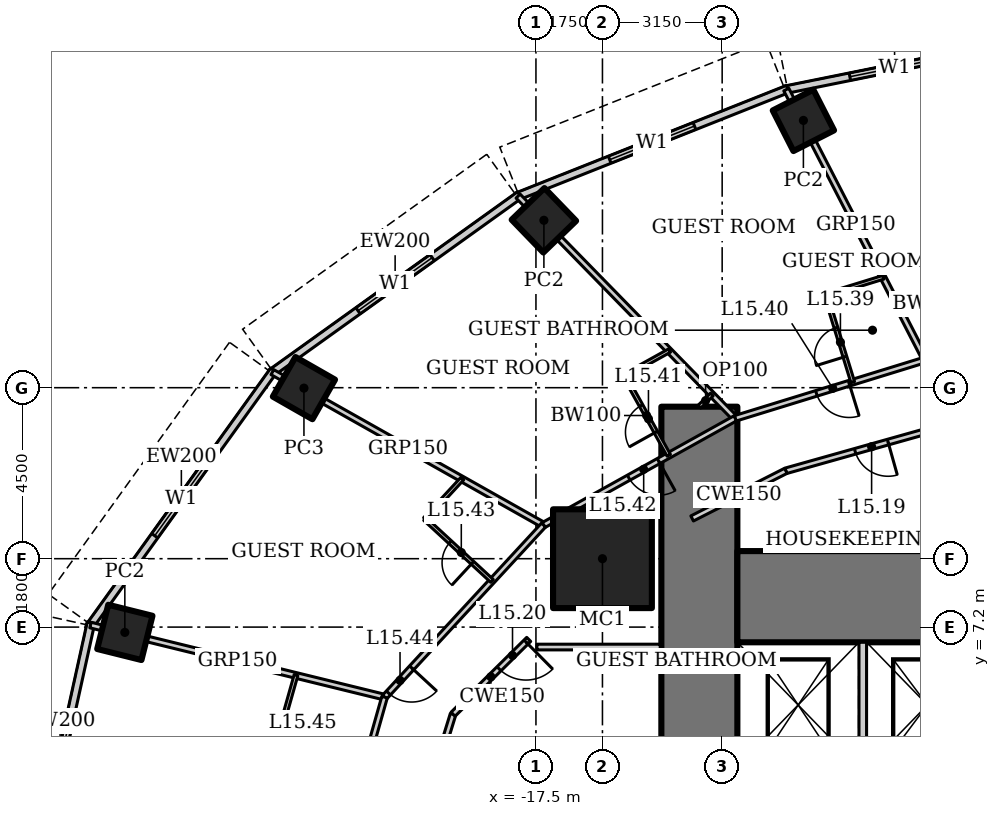
"""IFC4 building model, lengths in metres.
Left out: names, types, materials, properties, quantities, classifications, styles, units other than length and angle.
Written with IfcOpenShell. Run it as: python <this file> out.ifc"""

import sys

from ifc_helpers import new_model, si_unit, direction, frame, frame_2d, origin, origin_2d, place, context, subcontext, project, spatial, rectangle, hollow_rectangle, extrude, element, fill, save


model = new_model("IFC4")
c1 = context("Model", 3, precision=1e-05, world=origin(), true_north=direction((0.0, 1.0)))
c2 = subcontext(c1, "Body", "Model", "MODEL_VIEW")
j1 = project(units=[si_unit("LENGTHUNIT", "METRE"), si_unit("PLANEANGLEUNIT", "RADIAN")], contexts=[c1])
p1 = place(None, origin())
s1 = spatial("IfcSite", under=j1, at=p1, CompositionType="ELEMENT")
p2 = place(p1, origin())
s2 = spatial("IfcBuilding", under=s1, at=p2, CompositionType="ELEMENT")
p3 = place(p2, frame((0.0, 0.0, 69.4)))
s3 = spatial("IfcBuildingStorey", under=s2, at=p3, CompositionType="ELEMENT", Elevation=69.4)
p4 = place(p3, frame((-15.75, 9.0, 0.0), z_axis=(0.0, 0.0, 1.0), x_axis=(1.0, 0.0, 0.0)))
e1 = element("IfcColumn", 1, at=p4, inside=s3, PredefinedType="COLUMN", context=c2, shape_type="SweptSolid", body=[
    extrude(hollow_rectangle(XDim=2.6, YDim=2.6, WallThickness=0.13, at=origin_2d()), origin(), (0.0, 0.0, 1.0), 3.6),
])
for number, where, z_axis, x_axis in (
    (2, (-10.463, 20.534, 0.0), (0.0, 0.0, 1.0), (0.891, 0.454, 0.0)),
    (3, (-17.291, 17.905, 0.0), (0.0, 0.0, 1.0), (0.719, 0.695, 0.0)),
):
    element("IfcColumn", number, at=place(p3, frame(where, z_axis=z_axis, x_axis=x_axis)), inside=s3, PredefinedType="COLUMN", context=c2, shape_type="SweptSolid", body=[
        extrude(hollow_rectangle(XDim=1.2, YDim=1.2, WallThickness=0.1, at=origin_2d()), origin(), (0.0, 0.0, 1.0), 3.6),
    ])
p5 = place(p3, frame((-23.605, 13.489, 0.0), z_axis=(0.0, 0.0, 1.0), x_axis=(0.496139221777, 0.86824298017, 0.0)))
e4 = element("IfcColumn", 4, at=p5, inside=s3, PredefinedType="COLUMN", context=c2, shape_type="SweptSolid", body=[
    extrude(hollow_rectangle(XDim=1.2, YDim=1.2, WallThickness=0.12, at=origin_2d()), origin(), (0.0, 0.0, 1.0), 3.6),
])
p6 = place(p3, frame((-28.318, 7.06, 0.0), z_axis=(0.0, 0.0, 1.0), x_axis=(0.2419218956, 0.970295726276, 0.0)))
e5 = element("IfcColumn", 5, at=p6, inside=s3, PredefinedType="COLUMN", context=c2, shape_type="SweptSolid", body=[
    extrude(hollow_rectangle(XDim=1.2, YDim=1.2, WallThickness=0.1, at=origin_2d()), origin(), (0.0, 0.0, 1.0), 3.6),
])
p7 = place(p3, frame((-13.2, 13.0, 0.0), z_axis=(0.0, 0.0, 1.0), x_axis=(0.0, -1.0, 0.0)))
e6 = element("IfcWall", 6, at=p7, inside=s3, PredefinedType="SHEAR", context=c2, shape_type="SweptSolid", body=[
    extrude(rectangle(XDim=26.0, YDim=2.0, at=frame_2d((13.0, 0.0))), origin(), (0.0, 0.0, 1.0), 3.6),
])
p8 = place(p7, frame((12.1, 0.0, 0.0)))
e7 = element("IfcOpeningElement", 7, at=p8, cuts=e6, PredefinedType="OPENING", context=c2, shape_type="SweptSolid", body=[
    extrude(rectangle(XDim=1.8, YDim=2.1, at=frame_2d((0.9, 1.05))), frame((0.0, 1.01, 0.0), z_axis=(0.0, -1.0, 0.0), x_axis=(1.0, 0.0, 0.0)), (0.0, 0.0, 1.0), 2.02),
])
p9 = place(p3, frame((12.2, 8.0, 0.0), z_axis=(0.0, 0.0, 1.0), x_axis=(-1.0, 0.0, 0.0)))
e8 = element("IfcWall", 8, at=p9, inside=s3, PredefinedType="SHEAR", context=c2, shape_type="SweptSolid", body=[
    extrude(rectangle(XDim=24.4, YDim=2.4, at=frame_2d((12.2, 0.0))), origin(), (0.0, 0.0, 1.0), 3.6),
])
p10 = place(p3, frame((-8.9, 3.5, 0.0), z_axis=(0.0, 0.0, 1.0), x_axis=(0.0, 1.0, 0.0)))
e9 = element("IfcWall", 9, at=p10, inside=s3, PredefinedType="SOLIDWALL", context=c2, shape_type="SweptSolid", body=[
    extrude(rectangle(XDim=3.3, YDim=0.2, at=frame_2d((1.65, 0.0))), origin(), (0.0, 0.0, 1.0), 3.6),
])
p11 = place(p3, frame((-5.17, 22.504, 0.0), z_axis=(0.0, 0.0, 1.0), x_axis=(-0.980251657452, -0.197754110105, 0.0)))
e10 = element("IfcWall", 10, at=p11, inside=s3, PredefinedType="SOLIDWALL", context=c2, shape_type="SweptSolid", body=[
    extrude(rectangle(XDim=5.904, YDim=0.2, at=frame_2d((2.952, 0.0))), origin(), (0.0, 0.0, 1.0), 3.45),
])
p12 = place(p11, frame((1.752, 0.0, 0.5)))
e11 = element("IfcOpeningElement", 11, at=p12, cuts=e10, PredefinedType="OPENING", context=c2, shape_type="SweptSolid", body=[
    extrude(rectangle(XDim=2.4, YDim=2.2, at=frame_2d((1.2, 1.1))), frame((0.0, 0.11, 0.0), z_axis=(0.0, -1.0, 0.0), x_axis=(1.0, 0.0, 0.0)), (0.0, 0.0, 1.0), 0.22),
])
p13 = place(p3, frame((-10.869, 21.363, 0.0), z_axis=(0.0, 0.0, 1.0), x_axis=(-0.929358351251, -0.369178892895, 0.0)))
e12 = element("IfcWall", 12, at=p13, inside=s3, PredefinedType="SOLIDWALL", context=c2, shape_type="SweptSolid", body=[
    extrude(rectangle(XDim=7.692, YDim=0.2, at=frame_2d((3.846, 0.0))), origin(), (0.0, 0.0, 1.0), 3.45),
])
p14 = place(p13, frame((2.646, 0.0, 0.5)))
e13 = element("IfcOpeningElement", 13, at=p14, cuts=e12, PredefinedType="OPENING", context=c2, shape_type="SweptSolid", body=[
    extrude(rectangle(XDim=2.4, YDim=2.2, at=frame_2d((1.2, 1.1))), frame((0.0, 0.11, 0.0), z_axis=(0.0, -1.0, 0.0), x_axis=(1.0, 0.0, 0.0)), (0.0, 0.0, 1.0), 0.22),
])
p15 = place(p3, frame((-17.929, 18.572, 0.0), z_axis=(0.0, 0.0, 1.0), x_axis=(-0.812791321576, -0.582554948112, 0.0)))
e14 = element("IfcWall", 14, at=p15, inside=s3, PredefinedType="SOLIDWALL", context=c2, shape_type="SweptSolid", body=[
    extrude(rectangle(XDim=8.063, YDim=0.2, at=frame_2d((4.032, 0.0))), origin(), (0.0, 0.0, 1.0), 3.45),
])
p16 = place(p15, frame((2.832, 0.0, 0.5)))
e15 = element("IfcOpeningElement", 15, at=p16, cuts=e14, PredefinedType="OPENING", context=c2, shape_type="SweptSolid", body=[
    extrude(rectangle(XDim=2.4, YDim=2.2, at=frame_2d((1.2, 1.1))), frame((0.0, 0.11, 0.0), z_axis=(0.0, -1.0, 0.0), x_axis=(1.0, 0.0, 0.0)), (0.0, 0.0, 1.0), 0.22),
])
p17 = place(p3, frame((-24.4, 13.957, 0.0), z_axis=(0.0, 0.0, 1.0), x_axis=(-0.583937613703, -0.811798536155, 0.0)))
e16 = element("IfcWall", 16, at=p17, inside=s3, PredefinedType="SOLIDWALL", context=c2, shape_type="SweptSolid", body=[
    extrude(rectangle(XDim=8.323, YDim=0.2, at=frame_2d((4.162, 0.0))), origin(), (0.0, 0.0, 1.0), 3.45),
])
p18 = place(p17, frame((2.961, 0.0, 0.5)))
e17 = element("IfcOpeningElement", 17, at=p18, cuts=e16, PredefinedType="OPENING", context=c2, shape_type="SweptSolid", body=[
    extrude(rectangle(XDim=2.4, YDim=2.2, at=frame_2d((1.2, 1.1))), frame((0.0, 0.11, 0.0), z_axis=(0.0, -1.0, 0.0), x_axis=(1.0, 0.0, 0.0)), (0.0, 0.0, 1.0), 0.22),
])
p19 = place(p3, frame((-29.208, 7.318, 0.0), z_axis=(0.0, 0.0, 1.0), x_axis=(-0.215238065514, -0.976561608478, 0.0)))
e18 = element("IfcWall", 18, at=p19, inside=s3, PredefinedType="SOLIDWALL", context=c2, shape_type="SweptSolid", body=[
    extrude(rectangle(XDim=7.562, YDim=0.2, at=frame_2d((3.781, 0.0))), origin(), (0.0, 0.0, 1.0), 3.45),
])
p20 = place(p19, frame((2.581, 0.0, 0.5)))
e19 = element("IfcOpeningElement", 19, at=p20, cuts=e18, PredefinedType="OPENING", context=c2, shape_type="SweptSolid", body=[
    extrude(rectangle(XDim=2.4, YDim=2.2, at=frame_2d((1.2, 1.1))), frame((0.0, 0.11, 0.0), z_axis=(0.0, -1.0, 0.0), x_axis=(1.0, 0.0, 0.0)), (0.0, 0.0, 1.0), 0.22),
])
p21 = place(p3, frame((-10.912, 21.346, 0.0), z_axis=(0.0, 0.0, 1.0), x_axis=(0.45752665959, -0.889195904042, 0.0)))
e20 = element("IfcWall", 20, at=p21, inside=s3, PredefinedType="PARTITIONING", context=c2, shape_type="SweptSolid", body=[
    extrude(rectangle(XDim=7.997, YDim=0.15, at=frame_2d((3.999, 0.0))), origin(), (0.0, 0.0, 1.0), 2.528),
])
p22 = place(p3, frame((-17.97, 18.542, 0.0), z_axis=(0.0, 0.0, 1.0), x_axis=(0.698757291878, -0.715358823981, 0.0)))
e21 = element("IfcWall", 21, at=p22, inside=s3, PredefinedType="PARTITIONING", context=c2, shape_type="SweptSolid", body=[
    extrude(rectangle(XDim=8.177, YDim=0.15, at=frame_2d((4.088, 0.0))), origin(), (0.0, 0.0, 1.0), 2.528),
])
p23 = place(p3, frame((-24.435, 13.909, 0.0), z_axis=(0.0, 0.0, 1.0), x_axis=(0.871075246657, -0.491149584813, 0.0)))
e22 = element("IfcWall", 22, at=p23, inside=s3, PredefinedType="PARTITIONING", context=c2, shape_type="SweptSolid", body=[
    extrude(rectangle(XDim=8.192, YDim=0.15, at=frame_2d((4.096, 0.0))), origin(), (0.0, 0.0, 1.0), 2.693),
])
p24 = place(p3, frame((-29.222, 7.254, 0.0), z_axis=(0.0, 0.0, 1.0), x_axis=(0.971235585172, -0.238120637695, 0.0)))
e23 = element("IfcWall", 23, at=p24, inside=s3, PredefinedType="PARTITIONING", context=c2, shape_type="SweptSolid", body=[
    extrude(rectangle(XDim=7.968, YDim=0.15, at=frame_2d((3.984, 0.0))), origin(), (0.0, 0.0, 1.0), 2.333),
])
p25 = place(p3, frame((-7.253, 14.235, 0.0), z_axis=(0.0, 0.0, 1.0), x_axis=(-0.955657956744, -0.294478980085, 0.0)))
e24 = element("IfcWall", 24, at=p25, inside=s3, PredefinedType="PARTITIONING", context=c2, shape_type="SweptSolid", body=[
    extrude(rectangle(XDim=5.236, YDim=0.15, at=frame_2d((2.618, 0.0))), origin(), (0.0, 0.0, 1.0), 3.45),
])
p26 = place(p25, frame((2.1, 0.0, 0.0)))
e25 = element("IfcOpeningElement", 25, at=p26, cuts=e24, PredefinedType="OPENING", context=c2, shape_type="SweptSolid", body=[
    extrude(rectangle(XDim=0.9, YDim=2.1, at=frame_2d((0.45, 1.05))), frame((0.0, 0.085, 0.0), z_axis=(0.0, -1.0, 0.0), x_axis=(1.0, 0.0, 0.0)), (0.0, 0.0, 1.0), 0.17),
])
p27 = place(p3, frame((-12.257, 12.693, 0.0), z_axis=(0.0, 0.0, 1.0), x_axis=(-0.873695910579, -0.486472461541, 0.0)))
e26 = element("IfcWall", 26, at=p27, inside=s3, PredefinedType="PARTITIONING", context=c2, shape_type="SweptSolid", body=[
    extrude(rectangle(XDim=5.771, YDim=0.15, at=frame_2d((2.885, 0.0))), origin(), (0.0, 0.0, 1.0), 3.45),
])
p28 = place(p27, frame((2.306, 0.0, 0.0)))
e27 = element("IfcOpeningElement", 27, at=p28, cuts=e26, PredefinedType="OPENING", context=c2, shape_type="SweptSolid", body=[
    extrude(rectangle(XDim=0.9, YDim=2.1, at=frame_2d((0.45, 1.05))), frame((0.0, 0.085, 0.0), z_axis=(0.0, -1.0, 0.0), x_axis=(1.0, 0.0, 0.0)), (0.0, 0.0, 1.0), 0.17),
])
p29 = place(p3, frame((-17.299, 9.885, 0.0), z_axis=(0.0, 0.0, 1.0), x_axis=(-0.678641806296, -0.734469399463, 0.0)))
e28 = element("IfcWall", 28, at=p29, inside=s3, PredefinedType="PARTITIONING", context=c2, shape_type="SweptSolid", body=[
    extrude(rectangle(XDim=6.166, YDim=0.15, at=frame_2d((3.083, 0.0))), origin(), (0.0, 0.0, 1.0), 3.45),
])
p30 = place(p29, frame((5.116, 0.0, 0.0)))
e29 = element("IfcOpeningElement", 29, at=p30, cuts=e28, PredefinedType="OPENING", context=c2, shape_type="SweptSolid", body=[
    extrude(rectangle(XDim=0.9, YDim=2.1, at=frame_2d((0.45, 1.05))), frame((0.0, 0.085, 0.0), z_axis=(0.0, -1.0, 0.0), x_axis=(1.0, 0.0, 0.0)), (0.0, 0.0, 1.0), 0.17),
])
p31 = place(p3, frame((-21.484, 5.356, 0.0), z_axis=(0.0, 0.0, 1.0), x_axis=(-0.272386051236, -0.962188047677, 0.0)))
e30 = element("IfcWall", 30, at=p31, inside=s3, PredefinedType="PARTITIONING", context=c2, shape_type="SweptSolid", body=[
    extrude(rectangle(XDim=5.567, YDim=0.15, at=frame_2d((2.783, 0.0))), origin(), (0.0, 0.0, 1.0), 3.45),
])
p32 = place(p31, frame((4.517, 0.0, 0.0)))
e31 = element("IfcOpeningElement", 31, at=p32, cuts=e30, PredefinedType="OPENING", context=c2, shape_type="SweptSolid", body=[
    extrude(rectangle(XDim=0.9, YDim=2.1, at=frame_2d((0.45, 1.05))), frame((0.0, 0.085, 0.0), z_axis=(0.0, -1.0, 0.0), x_axis=(1.0, 0.0, 0.0)), (0.0, 0.0, 1.0), 0.17),
])
p33 = place(p3, frame((-6.411, 12.582, 0.0), z_axis=(0.0, 0.0, 1.0), x_axis=(-0.962643729928, -0.270771211967, 0.0)))
e32 = element("IfcWall", 32, at=p33, inside=s3, PredefinedType="PARTITIONING", context=c2, shape_type="SweptSolid", body=[
    extrude(rectangle(XDim=4.688, YDim=0.15, at=frame_2d((2.344, 0.0))), origin(), (0.0, 0.0, 1.0), 3.45),
])
p34 = place(p33, frame((1.894, 0.0, 0.0)))
e33 = element("IfcOpeningElement", 33, at=p34, cuts=e32, PredefinedType="OPENING", context=c2, shape_type="SweptSolid", body=[
    extrude(rectangle(XDim=0.9, YDim=2.1, at=frame_2d((0.45, 1.05))), frame((0.0, 0.085, 0.0), z_axis=(0.0, -1.0, 0.0), x_axis=(1.0, 0.0, 0.0)), (0.0, 0.0, 1.0), 0.17),
])
p35 = place(p3, frame((-19.681, 4.907, 0.0), z_axis=(0.0, 0.0, 1.0), x_axis=(-0.295778570807, -0.955256529447, 0.0)))
e34 = element("IfcWall", 34, at=p35, inside=s3, PredefinedType="PARTITIONING", context=c2, shape_type="SweptSolid", body=[
    extrude(rectangle(XDim=4.195, YDim=0.15, at=frame_2d((2.097, 0.0))), origin(), (0.0, 0.0, 1.0), 3.45),
])
p36 = place(p3, frame((-9.164, 13.646, 0.0), z_axis=(0.0, 0.0, 1.0), x_axis=(-0.294507586191, 0.955649141514, 0.0)))
e35 = element("IfcWall", 35, at=p36, inside=s3, PredefinedType="PARTITIONING", context=c2, shape_type="SweptSolid", body=[
    extrude(rectangle(XDim=2.4, YDim=0.1, at=frame_2d((1.2, 0.0))), origin(), (0.0, 0.0, 1.0), 3.45),
])
p37 = place(p36, frame((0.7, 0.0, 0.0)))
e36 = element("IfcOpeningElement", 36, at=p37, cuts=e35, PredefinedType="OPENING", context=c2, shape_type="SweptSolid", body=[
    extrude(rectangle(XDim=0.8, YDim=2.1, at=frame_2d((0.4, 1.05))), frame((0.0, 0.06, 0.0), z_axis=(0.0, -1.0, 0.0), x_axis=(1.0, 0.0, 0.0)), (0.0, 0.0, 1.0), 0.12),
])
p38 = place(p3, frame((-9.871, 15.939, 0.0), z_axis=(0.0, 0.0, 1.0), x_axis=(0.955642133669, 0.29453032502, 0.0)))
e37 = element("IfcWall", 37, at=p38, inside=s3, PredefinedType="PARTITIONING", context=c2, shape_type="SweptSolid", body=[
    extrude(rectangle(XDim=1.583, YDim=0.1, at=frame_2d((0.791, 0.0))), origin(), (0.0, 0.0, 1.0), 3.45),
])
p39 = place(p3, frame((-14.004, 11.719, 0.0), z_axis=(0.0, 0.0, 1.0), x_axis=(-0.486445964861, 0.873710663361, 0.0)))
e38 = element("IfcWall", 38, at=p39, inside=s3, PredefinedType="PARTITIONING", context=c2, shape_type="SweptSolid", body=[
    extrude(rectangle(XDim=2.4, YDim=0.1, at=frame_2d((1.2, 0.0))), origin(), (0.0, 0.0, 1.0), 3.45),
])
p40 = place(p39, frame((0.7, 0.0, 0.0)))
e39 = element("IfcOpeningElement", 39, at=p40, cuts=e38, PredefinedType="OPENING", context=c2, shape_type="SweptSolid", body=[
    extrude(rectangle(XDim=0.8, YDim=2.1, at=frame_2d((0.4, 1.05))), frame((0.0, 0.06, 0.0), z_axis=(0.0, -1.0, 0.0), x_axis=(1.0, 0.0, 0.0)), (0.0, 0.0, 1.0), 0.12),
])
p41 = place(p3, frame((-15.172, 13.816, 0.0), z_axis=(0.0, 0.0, 1.0), x_axis=(0.873640924532, 0.486571202377, 0.0)))
e40 = element("IfcWall", 40, at=p41, inside=s3, PredefinedType="PARTITIONING", context=c2, shape_type="SweptSolid", body=[
    extrude(rectangle(XDim=1.362, YDim=0.1, at=frame_2d((0.681, 0.0))), origin(), (0.0, 0.0, 1.0), 3.45),
])
p42 = place(p3, frame((-18.656, 8.416, 0.0), z_axis=(0.0, 0.0, 1.0), x_axis=(-0.73447964986, 0.678630712495, 0.0)))
e41 = element("IfcWall", 41, at=p42, inside=s3, PredefinedType="PARTITIONING", context=c2, shape_type="SweptSolid", body=[
    extrude(rectangle(XDim=2.4, YDim=0.1, at=frame_2d((1.2, 0.0))), origin(), (0.0, 0.0, 1.0), 3.45),
])
p43 = place(p42, frame((0.7, 0.0, 0.0)))
e42 = element("IfcOpeningElement", 42, at=p43, cuts=e41, PredefinedType="OPENING", context=c2, shape_type="SweptSolid", body=[
    extrude(rectangle(XDim=0.8, YDim=2.1, at=frame_2d((0.4, 1.05))), frame((0.0, 0.06, 0.0), z_axis=(0.0, -1.0, 0.0), x_axis=(1.0, 0.0, 0.0)), (0.0, 0.0, 1.0), 0.12),
])
p44 = place(p3, frame((-20.419, 10.045, 0.0), z_axis=(0.0, 0.0, 1.0), x_axis=(0.67861657312, 0.734492713842, 0.0)))
e43 = element("IfcWall", 43, at=p44, inside=s3, PredefinedType="PARTITIONING", context=c2, shape_type="SweptSolid", body=[
    extrude(rectangle(XDim=1.446, YDim=0.1, at=frame_2d((0.723, 0.0))), origin(), (0.0, 0.0, 1.0), 3.45),
])
p45 = place(p3, frame((-24.338, 4.086, 0.0), z_axis=(0.0, 0.0, 1.0), x_axis=(0.27242442481, 0.962177183666, 0.0)))
e44 = element("IfcWall", 44, at=p45, inside=s3, PredefinedType="PARTITIONING", context=c2, shape_type="SweptSolid", body=[
    extrude(rectangle(XDim=1.924, YDim=0.1, at=frame_2d((0.962, 0.0))), origin(), (0.0, 0.0, 1.0), 3.45),
])
p46 = place(p3, frame((-13.2, 13.0, 0.0), z_axis=(0.0, 0.0, 1.0), x_axis=(0.715289751842, 0.698827998087, 0.0)))
e45 = element("IfcWall", 45, at=p46, inside=s3, PredefinedType="PARTITIONING", context=c2, shape_type="SweptSolid", body=[
    extrude(rectangle(XDim=0.46, YDim=0.1, at=frame_2d((0.23, 0.0))), origin(), (0.0, 0.0, 1.0), 3.45),
])
p47 = place(p3, frame((-10.924, 11.312, 0.0), z_axis=(0.0, 0.0, 1.0), x_axis=(-0.891388152271, -0.453240732935, 0.0)))
e46 = element("IfcWall", 46, at=p47, inside=s3, PredefinedType="PARTITIONING", context=c2, shape_type="SweptSolid", body=[
    extrude(rectangle(XDim=2.766, YDim=0.15, at=frame_2d((1.383, 0.0))), origin(), (0.0, 0.0, 1.0), 3.45),
])
p48 = place(p3, frame((-17.69, 6.876, 0.0), z_axis=(0.0, 0.0, 1.0), x_axis=(-0.710845937688, -0.70334774676, 0.0)))
e47 = element("IfcWall", 47, at=p48, inside=s3, PredefinedType="PARTITIONING", context=c2, shape_type="SweptSolid", body=[
    extrude(rectangle(XDim=2.8, YDim=0.15, at=frame_2d((1.4, 0.0))), origin(), (0.0, 0.0, 1.0), 3.45),
])
p49 = place(p48, frame((0.1, 0.0, 0.0)))
e48 = element("IfcOpeningElement", 48, at=p49, cuts=e47, PredefinedType="OPENING", context=c2, shape_type="SweptSolid", body=[
    extrude(rectangle(XDim=1.0, YDim=2.1, at=frame_2d((0.5, 1.05))), frame((0.0, 0.085, 0.0), z_axis=(0.0, -1.0, 0.0), x_axis=(1.0, 0.0, 0.0)), (0.0, 0.0, 1.0), 0.17),
])
p50 = place(p3, frame((-14.23, 6.675, 0.0), z_axis=(0.0, 0.0, 1.0), x_axis=(-1.0, 0.0, 0.0)))
e49 = element("IfcWall", 49, at=p50, inside=s3, PredefinedType="PARTITIONING", context=c2, shape_type="SweptSolid", body=[
    extrude(rectangle(XDim=3.245, YDim=0.15, at=frame_2d((1.622, 0.0))), origin(), (0.0, 0.0, 1.0), 3.45),
])
p51 = place(p12, origin())
e50 = element("IfcWindow", 50, at=p51, inside=s3, PartitioningType="SINGLE_PANEL", PredefinedType="WINDOW", context=c2, shape_type="SweptSolid", body=[
    extrude(rectangle(XDim=2.4, YDim=2.2, at=frame_2d((1.2, 1.1))), frame((0.0, 0.03, 0.0), z_axis=(0.0, -1.0, 0.0), x_axis=(1.0, 0.0, 0.0)), (0.0, 0.0, 1.0), 0.06),
])
fill(e11, e50)
p52 = place(p14, origin())
e51 = element("IfcWindow", 51, at=p52, inside=s3, PartitioningType="SINGLE_PANEL", PredefinedType="WINDOW", context=c2, shape_type="SweptSolid", body=[
    extrude(rectangle(XDim=2.4, YDim=2.2, at=frame_2d((1.2, 1.1))), frame((0.0, 0.03, 0.0), z_axis=(0.0, -1.0, 0.0), x_axis=(1.0, 0.0, 0.0)), (0.0, 0.0, 1.0), 0.06),
])
fill(e13, e51)
p53 = place(p16, origin())
e52 = element("IfcWindow", 52, at=p53, inside=s3, PartitioningType="SINGLE_PANEL", PredefinedType="WINDOW", context=c2, shape_type="SweptSolid", body=[
    extrude(rectangle(XDim=2.4, YDim=2.2, at=frame_2d((1.2, 1.1))), frame((0.0, 0.03, 0.0), z_axis=(0.0, -1.0, 0.0), x_axis=(1.0, 0.0, 0.0)), (0.0, 0.0, 1.0), 0.06),
])
fill(e15, e52)
p54 = place(p18, origin())
e53 = element("IfcWindow", 53, at=p54, inside=s3, PartitioningType="SINGLE_PANEL", PredefinedType="WINDOW", context=c2, shape_type="SweptSolid", body=[
    extrude(rectangle(XDim=2.4, YDim=2.2, at=frame_2d((1.2, 1.1))), frame((0.0, 0.03, 0.0), z_axis=(0.0, -1.0, 0.0), x_axis=(1.0, 0.0, 0.0)), (0.0, 0.0, 1.0), 0.06),
])
fill(e17, e53)
p55 = place(p20, origin())
e54 = element("IfcWindow", 54, at=p55, inside=s3, PartitioningType="SINGLE_PANEL", PredefinedType="WINDOW", context=c2, shape_type="SweptSolid", body=[
    extrude(rectangle(XDim=2.4, YDim=2.2, at=frame_2d((1.2, 1.1))), frame((0.0, 0.03, 0.0), z_axis=(0.0, -1.0, 0.0), x_axis=(1.0, 0.0, 0.0)), (0.0, 0.0, 1.0), 0.06),
])
fill(e19, e54)
p56 = place(p34, origin())
e55 = element("IfcDoor", 55, at=p56, inside=s3, OperationType="SINGLE_SWING_LEFT", PredefinedType="DOOR", context=c2, shape_type="SweptSolid", body=[
    extrude(rectangle(XDim=0.9, YDim=2.1, at=frame_2d((0.45, 1.05))), frame((0.0, 0.025, 0.0), z_axis=(0.0, -1.0, 0.0), x_axis=(1.0, 0.0, 0.0)), (0.0, 0.0, 1.0), 0.05),
])
fill(e33, e55)
p57 = place(p49, origin())
e56 = element("IfcDoor", 56, at=p57, inside=s3, OperationType="SINGLE_SWING_LEFT", PredefinedType="DOOR", context=c2, shape_type="SweptSolid", body=[
    extrude(rectangle(XDim=1.0, YDim=2.1, at=frame_2d((0.5, 1.05))), frame((0.0, 0.025, 0.0), z_axis=(0.0, -1.0, 0.0), x_axis=(1.0, 0.0, 0.0)), (0.0, 0.0, 1.0), 0.05),
])
fill(e48, e56)
p58 = place(p37, origin())
e57 = element("IfcDoor", 57, at=p58, inside=s3, OperationType="SINGLE_SWING_LEFT", PredefinedType="DOOR", context=c2, shape_type="SweptSolid", body=[
    extrude(rectangle(XDim=0.8, YDim=2.1, at=frame_2d((0.4, 1.05))), frame((0.0, 0.025, 0.0), z_axis=(0.0, -1.0, 0.0), x_axis=(1.0, 0.0, 0.0)), (0.0, 0.0, 1.0), 0.05),
])
fill(e36, e57)
p59 = place(p26, origin())
e58 = element("IfcDoor", 58, at=p59, inside=s3, OperationType="SINGLE_SWING_LEFT", PredefinedType="DOOR", context=c2, shape_type="SweptSolid", body=[
    extrude(rectangle(XDim=0.9, YDim=2.1, at=frame_2d((0.45, 1.05))), frame((0.0, 0.025, 0.0), z_axis=(0.0, -1.0, 0.0), x_axis=(1.0, 0.0, 0.0)), (0.0, 0.0, 1.0), 0.05),
])
fill(e25, e58)
p60 = place(p40, origin())
e59 = element("IfcDoor", 59, at=p60, inside=s3, OperationType="SINGLE_SWING_LEFT", PredefinedType="DOOR", context=c2, shape_type="SweptSolid", body=[
    extrude(rectangle(XDim=0.8, YDim=2.1, at=frame_2d((0.4, 1.05))), frame((0.0, 0.025, 0.0), z_axis=(0.0, -1.0, 0.0), x_axis=(1.0, 0.0, 0.0)), (0.0, 0.0, 1.0), 0.05),
])
fill(e39, e59)
p61 = place(p28, origin())
e60 = element("IfcDoor", 60, at=p61, inside=s3, OperationType="SINGLE_SWING_LEFT", PredefinedType="DOOR", context=c2, shape_type="SweptSolid", body=[
    extrude(rectangle(XDim=0.9, YDim=2.1, at=frame_2d((0.45, 1.05))), frame((0.0, 0.025, 0.0), z_axis=(0.0, -1.0, 0.0), x_axis=(1.0, 0.0, 0.0)), (0.0, 0.0, 1.0), 0.05),
])
fill(e27, e60)
p62 = place(p43, origin())
e61 = element("IfcDoor", 61, at=p62, inside=s3, OperationType="SINGLE_SWING_LEFT", PredefinedType="DOOR", context=c2, shape_type="SweptSolid", body=[
    extrude(rectangle(XDim=0.8, YDim=2.1, at=frame_2d((0.4, 1.05))), frame((0.0, 0.025, 0.0), z_axis=(0.0, -1.0, 0.0), x_axis=(1.0, 0.0, 0.0)), (0.0, 0.0, 1.0), 0.05),
])
fill(e42, e61)
p63 = place(p30, origin())
e62 = element("IfcDoor", 62, at=p63, inside=s3, OperationType="SINGLE_SWING_LEFT", PredefinedType="DOOR", context=c2, shape_type="SweptSolid", body=[
    extrude(rectangle(XDim=0.9, YDim=2.1, at=frame_2d((0.45, 1.05))), frame((0.0, 0.025, 0.0), z_axis=(0.0, -1.0, 0.0), x_axis=(1.0, 0.0, 0.0)), (0.0, 0.0, 1.0), 0.05),
])
fill(e29, e62)
save(model, sys.argv[1])
